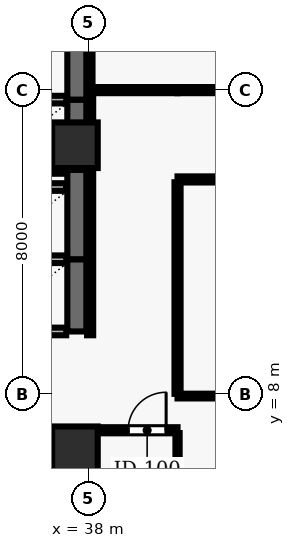
"""IFC4 building model, lengths in metres.
Left out: names, types, materials, properties, quantities, classifications, styles, units other than length and angle.
Written with IfcOpenShell. Run it as: python <this file> out.ifc"""

import sys

from ifc_helpers import new_model, si_unit, direction, frame, frame_2d, origin, origin_2d, place, context, subcontext, project, spatial, rectangle, extrude, element, fill, save


model = new_model("IFC4")
c1 = context("Model", 3, precision=1e-05, world=origin(), true_north=direction((0.0, 1.0)))
c2 = subcontext(c1, "Body", "Model", "MODEL_VIEW")
j1 = project(units=[si_unit("LENGTHUNIT", "METRE"), si_unit("PLANEANGLEUNIT", "RADIAN")], contexts=[c1])
p1 = place(None, origin())
s1 = spatial("IfcSite", under=j1, at=p1, CompositionType="ELEMENT")
p2 = place(p1, origin())
s2 = spatial("IfcBuilding", under=s1, at=p2, CompositionType="ELEMENT")
p3 = place(p2, frame((0.0, 0.0, 103.4)))
s3 = spatial("IfcBuildingStorey", under=s2, at=p3, CompositionType="ELEMENT", Elevation=103.4)
for number, where, z_axis, x_axis in (
    (1, (37.65, 6.55, 0.0), (0.0, 0.0, 1.0), (1.0, 0.0, 0.0)),
    (2, (37.65, 14.55, 0.0), (0.0, 0.0, 1.0), (1.0, 0.0, 0.0)),
):
    element("IfcColumn", number, at=place(p3, frame(where, z_axis=z_axis, x_axis=x_axis)), inside=s3, PredefinedType="COLUMN", context=c2, shape_type="SweptSolid", body=[
        extrude(rectangle(XDim=1.2, YDim=1.2, at=origin_2d()), origin(), (0.0, 0.0, 1.0), 3.9),
    ])
p4 = place(p3, frame((37.7, 4.7, 0.0), z_axis=(0.0, 0.0, 1.0), x_axis=(0.0, 1.0, 0.0)))
e3 = element("IfcWall", 3, at=p4, inside=s3, PredefinedType="SHEAR", context=c2, shape_type="SweptSolid", body=[
    extrude(rectangle(XDim=2.25, YDim=0.5, at=frame_2d((1.125, 0.0))), origin(), (0.0, 0.0, 1.0), 3.69),
])
p5 = place(p3, frame((37.42, 6.95, 0.0), z_axis=(0.0, 0.0, 1.0), x_axis=(-1.0, 0.0, 0.0)))
e4 = element("IfcWall", 4, at=p5, inside=s3, PredefinedType="SOLIDWALL", context=c2, shape_type="SweptSolid", body=[
    extrude(rectangle(XDim=2.14, YDim=0.2, at=frame_2d((1.07, 0.0))), origin(), (0.0, 0.0, 1.0), 3.69),
])
p6 = place(p3, frame((37.7, 9.65, 0.0), z_axis=(0.0, 0.0, 1.0), x_axis=(0.0, 1.0, 0.0)))
e5 = element("IfcWall", 5, at=p6, inside=s3, PredefinedType="SHEAR", context=c2, shape_type="SweptSolid", body=[
    extrude(rectangle(XDim=1.9, YDim=0.5, at=frame_2d((0.95, 0.0))), origin(), (0.0, 0.0, 1.0), 3.69),
])
for number, where, z_axis, x_axis in (
    (6, (35.28, 9.65, 0.0), (0.0, 0.0, 1.0), (1.0, 0.0, 0.0)),
    (7, (37.42, 11.55, 0.0), (0.0, 0.0, 1.0), (-1.0, 0.0, 0.0)),
):
    element("IfcWall", number, at=place(p3, frame(where, z_axis=z_axis, x_axis=x_axis)), inside=s3, PredefinedType="SOLIDWALL", context=c2, shape_type="SweptSolid", body=[
        extrude(rectangle(XDim=2.14, YDim=0.2, at=frame_2d((1.07, 0.0))), origin(), (0.0, 0.0, 1.0), 3.69),
    ])
p7 = place(p3, frame((37.7, 11.55, 0.0), z_axis=(0.0, 0.0, 1.0), x_axis=(0.0, 1.0, 0.0)))
e8 = element("IfcWall", 8, at=p7, inside=s3, PredefinedType="SHEAR", context=c2, shape_type="SweptSolid", body=[
    extrude(rectangle(XDim=2.35, YDim=0.5, at=frame_2d((1.175, 0.0))), origin(), (0.0, 0.0, 1.0), 3.69),
])
p8 = place(p3, frame((37.42, 13.45, 0.0), z_axis=(0.0, 0.0, 1.0), x_axis=(-1.0, 0.0, 0.0)))
e9 = element("IfcWall", 9, at=p8, inside=s3, PredefinedType="SOLIDWALL", context=c2, shape_type="SweptSolid", body=[
    extrude(rectangle(XDim=2.14, YDim=0.2, at=frame_2d((1.07, 0.0))), origin(), (0.0, 0.0, 1.0), 3.69),
])
p9 = place(p3, frame((37.7, 13.9, 0.0), z_axis=(0.0, 0.0, 1.0), x_axis=(0.0, 1.0, 0.0)))
e10 = element("IfcWall", 10, at=p9, inside=s3, PredefinedType="SHEAR", context=c2, shape_type="SweptSolid", body=[
    extrude(rectangle(XDim=1.85, YDim=0.5, at=frame_2d((0.925, 0.0))), origin(), (0.0, 0.0, 1.0), 3.69),
])
for number, where, z_axis, x_axis in (
    (11, (35.28, 13.9, 0.0), (0.0, 0.0, 1.0), (1.0, 0.0, 0.0)),
    (12, (37.42, 15.75, 0.0), (0.0, 0.0, 1.0), (-1.0, 0.0, 0.0)),
):
    element("IfcWall", number, at=place(p3, frame(where, z_axis=z_axis, x_axis=x_axis)), inside=s3, PredefinedType="SOLIDWALL", context=c2, shape_type="SweptSolid", body=[
        extrude(rectangle(XDim=2.14, YDim=0.2, at=frame_2d((1.07, 0.0))), origin(), (0.0, 0.0, 1.0), 3.69),
    ])
p10 = place(p3, frame((37.7, 15.75, 0.0), z_axis=(0.0, 0.0, 1.0), x_axis=(0.0, 1.0, 0.0)))
e13 = element("IfcWall", 13, at=p10, inside=s3, PredefinedType="SHEAR", context=c2, shape_type="SweptSolid", body=[
    extrude(rectangle(XDim=1.85, YDim=0.5, at=frame_2d((0.925, 0.0))), origin(), (0.0, 0.0, 1.0), 3.69),
])
p11 = place(p3, frame((38.05, 7.05, 0.0), z_axis=(0.0, 0.0, 1.0), x_axis=(1.0, 0.0, 0.0)))
e14 = element("IfcWall", 14, at=p11, inside=s3, PredefinedType="PARTITIONING", context=c2, shape_type="SweptSolid", body=[
    extrude(rectangle(XDim=2.3, YDim=0.16, at=frame_2d((1.15, 0.0))), origin(), (0.0, 0.0, 1.0), 3.69),
])
p12 = place(p11, frame((1.0, 0.0, 0.0)))
e15 = element("IfcOpeningElement", 15, at=p12, cuts=e14, PredefinedType="OPENING", context=c2, shape_type="SweptSolid", body=[
    extrude(rectangle(XDim=1.0, YDim=2.1, at=frame_2d((0.5, 1.05))), frame((0.0, 0.09, 0.0), z_axis=(0.0, -1.0, 0.0), x_axis=(1.0, 0.0, 0.0)), (0.0, 0.0, 1.0), 0.18),
])
p13 = place(p3, frame((40.35, 13.65, 0.0), z_axis=(0.0, 0.0, 1.0), x_axis=(1.0, 0.0, 0.0)))
e16 = element("IfcWall", 16, at=p13, inside=s3, PredefinedType="PARTITIONING", context=c2, shape_type="SweptSolid", body=[
    extrude(rectangle(XDim=9.98, YDim=0.16, at=frame_2d((4.99, 0.0))), origin(), (0.0, 0.0, 1.0), 3.69),
])
p14 = place(p13, frame((3.79, 0.0, 0.0)))
e17 = element("IfcOpeningElement", 17, at=p14, cuts=e16, PredefinedType="OPENING", context=c2, shape_type="SweptSolid", body=[
    extrude(rectangle(XDim=1.0, YDim=2.1, at=frame_2d((0.5, 1.05))), frame((0.0, 0.09, 0.0), z_axis=(0.0, -1.0, 0.0), x_axis=(1.0, 0.0, 0.0)), (0.0, 0.0, 1.0), 0.18),
])
p15 = place(p3, frame((40.35, 16.0, 0.0), z_axis=(0.0, 0.0, 1.0), x_axis=(-1.0, 0.0, 0.0)))
e18 = element("IfcWall", 18, at=p15, inside=s3, PredefinedType="PARTITIONING", context=c2, shape_type="SweptSolid", body=[
    extrude(rectangle(XDim=2.3, YDim=0.16, at=frame_2d((1.15, 0.0))), origin(), (0.0, 0.0, 1.0), 3.69),
])
p16 = place(p3, frame((40.35, 16.0, 0.0), z_axis=(0.0, 0.0, 1.0), x_axis=(1.0, 0.0, 0.0)))
e19 = element("IfcWall", 19, at=p16, inside=s3, PredefinedType="PARTITIONING", context=c2, shape_type="SweptSolid", body=[
    extrude(rectangle(XDim=8.161, YDim=0.16, at=frame_2d((4.081, 0.0))), origin(), (0.0, 0.0, 1.0), 3.69),
])
p17 = place(p16, frame((3.281, 0.0, 0.0)))
e20 = element("IfcOpeningElement", 20, at=p17, cuts=e19, PredefinedType="OPENING", context=c2, shape_type="SweptSolid", body=[
    extrude(rectangle(XDim=0.9, YDim=2.1, at=frame_2d((0.45, 1.05))), frame((0.0, 0.09, 0.0), z_axis=(0.0, -1.0, 0.0), x_axis=(1.0, 0.0, 0.0)), (0.0, 0.0, 1.0), 0.18),
])
p18 = place(p3, frame((50.33, 7.95, 0.0), z_axis=(0.0, 0.0, 1.0), x_axis=(-1.0, 0.0, 0.0)))
e21 = element("IfcWall", 21, at=p18, inside=s3, PredefinedType="PARTITIONING", context=c2, shape_type="SweptSolid", body=[
    extrude(rectangle(XDim=9.98, YDim=0.125, at=frame_2d((4.99, 0.0))), origin(), (0.0, 0.0, 1.0), 3.074),
])
p19 = place(p3, frame((38.05, 6.975, 0.0), z_axis=(0.0, 0.0, 1.0), x_axis=(0.0, -1.0, 0.0)))
e22 = element("IfcWall", 22, at=p19, inside=s3, PredefinedType="PARTITIONING", context=c2, shape_type="SweptSolid", body=[
    extrude(rectangle(XDim=6.83, YDim=0.125, at=frame_2d((3.415, 0.0))), origin(), (0.0, 0.0, 1.0), 3.074),
])
p20 = place(p3, frame((38.05, 15.925, 0.0), z_axis=(0.0, 0.0, 1.0), x_axis=(0.0, -1.0, 0.0)))
e23 = element("IfcWall", 23, at=p20, inside=s3, PredefinedType="PARTITIONING", context=c2, shape_type="SweptSolid", body=[
    extrude(rectangle(XDim=6.375, YDim=0.16, at=frame_2d((3.188, 0.0))), origin(), (0.0, 0.0, 1.0), 3.074),
])
p21 = place(p3, frame((38.05, 24.05, 0.0), z_axis=(0.0, 0.0, 1.0), x_axis=(0.0, -1.0, 0.0)))
e24 = element("IfcWall", 24, at=p21, inside=s3, PredefinedType="PARTITIONING", context=c2, shape_type="SweptSolid", body=[
    extrude(rectangle(XDim=7.975, YDim=0.125, at=frame_2d((3.988, 0.0))), origin(), (0.0, 0.0, 1.0), 3.074),
])
p22 = place(p3, frame((40.35, 0.145, 0.0), z_axis=(0.0, 0.0, 1.0), x_axis=(0.0, 1.0, 0.0)))
e25 = element("IfcWall", 25, at=p22, inside=s3, PredefinedType="MOVABLE", context=c2, shape_type="SweptSolid", body=[
    extrude(rectangle(XDim=6.83, YDim=0.11, at=frame_2d((3.415, 0.0))), origin(), (0.0, 0.0, 1.0), 3.69),
])
p23 = place(p22, frame((2.965, 0.0, 0.0)))
e26 = element("IfcOpeningElement", 26, at=p23, cuts=e25, PredefinedType="OPENING", context=c2, shape_type="SweptSolid", body=[
    extrude(rectangle(XDim=0.9, YDim=2.1, at=frame_2d((0.45, 1.05))), frame((0.0, 0.065, 0.0), z_axis=(0.0, -1.0, 0.0), x_axis=(1.0, 0.0, 0.0)), (0.0, 0.0, 1.0), 0.13),
])
p24 = place(p3, frame((40.35, 8.008, 0.0), z_axis=(0.0, 0.0, 1.0), x_axis=(0.0, 1.0, 0.0)))
e27 = element("IfcWall", 27, at=p24, inside=s3, PredefinedType="PARTITIONING", context=c2, shape_type="SweptSolid", body=[
    extrude(rectangle(XDim=5.567, YDim=0.16, at=frame_2d((2.783, 0.0))), origin(), (0.0, 0.0, 1.0), 3.69),
])
p25 = place(p12, origin())
e28 = element("IfcDoor", 28, at=p25, inside=s3, OperationType="SINGLE_SWING_RIGHT", PredefinedType="DOOR", context=c2, shape_type="SweptSolid", body=[
    extrude(rectangle(XDim=1.0, YDim=2.1, at=frame_2d((0.5, 1.05))), frame((0.0, 0.025, 0.0), z_axis=(0.0, -1.0, 0.0), x_axis=(1.0, 0.0, 0.0)), (0.0, 0.0, 1.0), 0.05),
])
fill(e15, e28)
save(model, sys.argv[1])
